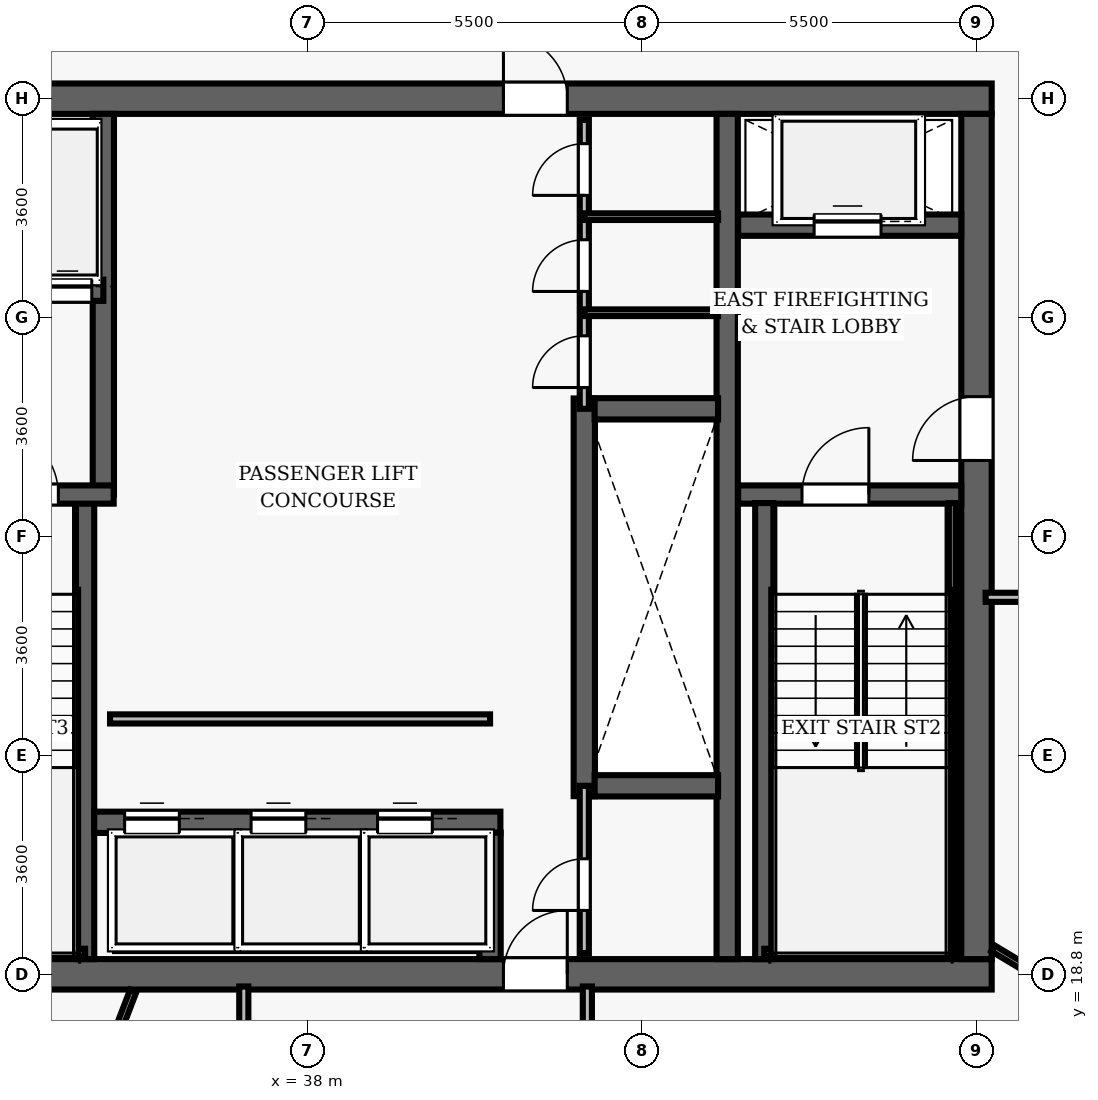
"""IFC4 building model, lengths in metres.
Left out: names, types, materials, properties, quantities, classifications, styles, units other than length and angle.
Written with IfcOpenShell. Run it as: python <this file> out.ifc"""

import sys

from ifc_helpers import new_model, si_unit, direction, frame, frame_2d, origin, place, context, subcontext, project, spatial, rectangle, extrude, element, fill, save


model = new_model("IFC4")
c1 = context("Model", 3, precision=1e-05, world=origin(), true_north=direction((0.0, 1.0)))
c2 = subcontext(c1, "Body", "Model", "MODEL_VIEW")
j1 = project(units=[si_unit("LENGTHUNIT", "METRE"), si_unit("PLANEANGLEUNIT", "RADIAN")], contexts=[c1])
p1 = place(None, origin())
s1 = spatial("IfcSite", under=j1, at=p1, CompositionType="ELEMENT")
p2 = place(p1, origin())
s2 = spatial("IfcBuilding", under=s1, at=p2, CompositionType="ELEMENT")
p3 = place(p2, frame((0.0, 0.0, 186.6)))
s3 = spatial("IfcBuildingStorey", under=s2, at=p3, CompositionType="ELEMENT", Elevation=186.6)
p4 = place(p3, frame((26.75, 18.8, 0.0), z_axis=(0.0, 0.0, 1.0), x_axis=(1.0, 0.0, 0.0)))
e1 = element("IfcWall", 1, at=p4, inside=s3, PredefinedType="SHEAR", context=c2, shape_type="SweptSolid", body=[
    extrude(rectangle(XDim=22.5, YDim=0.5, at=frame_2d((11.25, 0.0))), origin(), (0.0, 0.0, 1.0), 3.85),
])
p5 = place(p4, frame((14.47, 0.0, 0.0)))
e2 = element("IfcOpeningElement", 2, at=p5, cuts=e1, PredefinedType="OPENING", context=c2, shape_type="SweptSolid", body=[
    extrude(rectangle(XDim=1.05, YDim=2.15, at=frame_2d((0.525, 1.075))), frame((0.0, 0.26, 0.0), z_axis=(0.0, -1.0, 0.0), x_axis=(1.0, 0.0, 0.0)), (0.0, 0.0, 1.0), 0.52),
])
p6 = place(p3, frame((26.75, 33.2, 0.0), z_axis=(0.0, 0.0, 1.0), x_axis=(1.0, 0.0, 0.0)))
e3 = element("IfcWall", 3, at=p6, inside=s3, PredefinedType="SHEAR", context=c2, shape_type="SweptSolid", body=[
    extrude(rectangle(XDim=22.5, YDim=0.5, at=frame_2d((11.25, 0.0))), origin(), (0.0, 0.0, 1.0), 3.85),
])
p7 = place(p6, frame((4.57, 0.0, 0.0)))
e4 = element("IfcOpeningElement", 4, at=p7, cuts=e3, PredefinedType="OPENING", context=c2, shape_type="SweptSolid", body=[
    extrude(rectangle(XDim=1.05, YDim=2.15, at=frame_2d((0.525, 1.075))), frame((0.0, 0.26, 0.0), z_axis=(0.0, -1.0, 0.0), x_axis=(1.0, 0.0, 0.0)), (0.0, 0.0, 1.0), 0.52),
])
p8 = place(p6, frame((14.47, 0.0, 0.0)))
e5 = element("IfcOpeningElement", 5, at=p8, cuts=e3, PredefinedType="OPENING", context=c2, shape_type="SweptSolid", body=[
    extrude(rectangle(XDim=1.05, YDim=2.15, at=frame_2d((0.525, 1.075))), frame((0.0, 0.26, 0.0), z_axis=(0.0, -1.0, 0.0), x_axis=(1.0, 0.0, 0.0)), (0.0, 0.0, 1.0), 0.52),
])
p9 = place(p3, frame((49.0, 19.05, 0.0), z_axis=(0.0, 0.0, 1.0), x_axis=(0.0, 1.0, 0.0)))
e6 = element("IfcWall", 6, at=p9, inside=s3, PredefinedType="SHEAR", context=c2, shape_type="SweptSolid", body=[
    extrude(rectangle(XDim=13.9, YDim=0.5, at=frame_2d((6.95, 0.0))), origin(), (0.0, 0.0, 1.0), 3.85),
])
p10 = place(p9, frame((8.2, 0.0, 0.0)))
e7 = element("IfcOpeningElement", 7, at=p10, cuts=e6, PredefinedType="OPENING", context=c2, shape_type="SweptSolid", body=[
    extrude(rectangle(XDim=1.05, YDim=2.15, at=frame_2d((0.525, 1.075))), frame((0.0, 0.26, 0.0), z_axis=(0.0, -1.0, 0.0), x_axis=(1.0, 0.0, 0.0)), (0.0, 0.0, 1.0), 0.52),
])
p11 = place(p3, frame((44.9, 19.05, 0.0), z_axis=(0.0, 0.0, 1.0), x_axis=(0.0, 1.0, 0.0)))
e8 = element("IfcWall", 8, at=p11, inside=s3, PredefinedType="SHEAR", context=c2, shape_type="SweptSolid", body=[
    extrude(rectangle(XDim=13.9, YDim=0.35, at=frame_2d((6.95, 0.0))), origin(), (0.0, 0.0, 1.0), 3.85),
])
p12 = place(p3, frame((45.08, 26.69, 0.0), z_axis=(0.0, 0.0, 1.0), x_axis=(1.0, 0.0, 0.0)))
e9 = element("IfcWall", 9, at=p12, inside=s3, PredefinedType="SHEAR", context=c2, shape_type="SweptSolid", body=[
    extrude(rectangle(XDim=3.67, YDim=0.3, at=frame_2d((1.835, 0.0))), origin(), (0.0, 0.0, 1.0), 3.85),
])
p13 = place(p12, frame((1.05, 0.0, 0.0)))
e10 = element("IfcOpeningElement", 10, at=p13, cuts=e9, PredefinedType="OPENING", context=c2, shape_type="SweptSolid", body=[
    extrude(rectangle(XDim=1.1, YDim=2.15, at=frame_2d((0.55, 1.075))), frame((0.0, 0.16, 0.0), z_axis=(0.0, -1.0, 0.0), x_axis=(1.0, 0.0, 0.0)), (0.0, 0.0, 1.0), 0.32),
])
p14 = place(p3, frame((45.51, 19.05, 0.0), z_axis=(0.0, 0.0, 1.0), x_axis=(0.0, 1.0, 0.0)))
e11 = element("IfcWall", 11, at=p14, inside=s3, PredefinedType="SHEAR", context=c2, shape_type="SweptSolid", body=[
    extrude(rectangle(XDim=7.5, YDim=0.3, at=frame_2d((3.75, 0.0))), origin(), (0.0, 0.0, 1.0), 3.85),
])
p15 = place(p3, frame((48.605, 19.1, 0.0), z_axis=(0.0, 0.0, 1.0), x_axis=(0.0, 1.0, 0.0)))
e12 = element("IfcWall", 12, at=p15, inside=s3, PredefinedType="SHEAR", context=c2, shape_type="SweptSolid", body=[
    extrude(rectangle(XDim=7.45, YDim=0.12, at=frame_2d((3.725, 0.0))), origin(), (0.0, 0.0, 1.0), 3.85),
])
p16 = place(p3, frame((45.51, 19.16, 0.0), z_axis=(0.0, 0.0, 1.0), x_axis=(1.0, 0.0, 0.0)))
e13 = element("IfcWall", 13, at=p16, inside=s3, PredefinedType="SHEAR", context=c2, shape_type="SweptSolid", body=[
    extrude(rectangle(XDim=3.095, YDim=0.12, at=frame_2d((1.547, 0.0))), origin(), (0.0, 0.0, 1.0), 3.85),
])
p17 = place(p3, frame((45.08, 31.12, 0.0), z_axis=(0.0, 0.0, 1.0), x_axis=(1.0, 0.0, 0.0)))
e14 = element("IfcWall", 14, at=p17, inside=s3, PredefinedType="SHEAR", context=c2, shape_type="SweptSolid", body=[
    extrude(rectangle(XDim=3.67, YDim=0.35, at=frame_2d((1.835, 0.0))), origin(), (0.0, 0.0, 1.0), 3.035),
])
p18 = place(p17, frame((1.25, 0.0, 0.0)))
e15 = element("IfcOpeningElement", 15, at=p18, cuts=e14, PredefinedType="OPENING", context=c2, shape_type="SweptSolid", body=[
    extrude(rectangle(XDim=1.1, YDim=2.15, at=frame_2d((0.55, 1.075))), frame((0.0, 0.185, 0.0), z_axis=(0.0, -1.0, 0.0), x_axis=(1.0, 0.0, 0.0)), (0.0, 0.0, 1.0), 0.37),
])
p19 = place(p3, frame((34.34, 19.05, 0.0), z_axis=(0.0, 0.0, 1.0), x_axis=(0.0, 1.0, 0.0)))
e16 = element("IfcWall", 16, at=p19, inside=s3, PredefinedType="SHEAR", context=c2, shape_type="SweptSolid", body=[
    extrude(rectangle(XDim=7.5, YDim=0.3, at=frame_2d((3.75, 0.0))), origin(), (0.0, 0.0, 1.0), 3.85),
])
p20 = place(p3, frame((34.64, 26.69, 0.0), z_axis=(0.0, 0.0, 1.0), x_axis=(0.0, 1.0, 0.0)))
e17 = element("IfcWall", 17, at=p20, inside=s3, PredefinedType="SHEAR", context=c2, shape_type="SweptSolid", body=[
    extrude(rectangle(XDim=6.26, YDim=0.35, at=frame_2d((3.13, 0.0))), origin(), (0.0, 0.0, 1.0), 3.85),
])
p21 = place(p3, frame((31.25, 26.69, 0.0), z_axis=(0.0, 0.0, 1.0), x_axis=(1.0, 0.0, 0.0)))
e18 = element("IfcWall", 18, at=p21, inside=s3, PredefinedType="SHEAR", context=c2, shape_type="SweptSolid", body=[
    extrude(rectangle(XDim=3.56, YDim=0.3, at=frame_2d((1.78, 0.0))), origin(), (0.0, 0.0, 1.0), 3.85),
])
p22 = place(p21, frame((1.55, 0.0, 0.0)))
e19 = element("IfcOpeningElement", 19, at=p22, cuts=e18, PredefinedType="OPENING", context=c2, shape_type="SweptSolid", body=[
    extrude(rectangle(XDim=1.1, YDim=2.15, at=frame_2d((0.55, 1.075))), frame((0.0, 0.16, 0.0), z_axis=(0.0, -1.0, 0.0), x_axis=(1.0, 0.0, 0.0)), (0.0, 0.0, 1.0), 0.32),
])
p23 = place(p3, frame((31.3, 19.16, 0.0), z_axis=(0.0, 0.0, 1.0), x_axis=(1.0, 0.0, 0.0)))
e20 = element("IfcWall", 20, at=p23, inside=s3, PredefinedType="SHEAR", context=c2, shape_type="SweptSolid", body=[
    extrude(rectangle(XDim=3.04, YDim=0.12, at=frame_2d((1.52, 0.0))), origin(), (0.0, 0.0, 1.0), 3.85),
])
p24 = place(p3, frame((32.23, 30.05, 0.0), z_axis=(0.0, 0.0, 1.0), x_axis=(1.0, 0.0, 0.0)))
e21 = element("IfcWall", 21, at=p24, inside=s3, PredefinedType="SHEAR", context=c2, shape_type="SweptSolid", body=[
    extrude(rectangle(XDim=2.41, YDim=0.35, at=frame_2d((1.205, 0.0))), origin(), (0.0, 0.0, 1.0), 3.035),
])
p25 = place(p24, frame((0.42, 0.0, 0.0)))
e22 = element("IfcOpeningElement", 22, at=p25, cuts=e21, PredefinedType="OPENING", context=c2, shape_type="SweptSolid", body=[
    extrude(rectangle(XDim=0.8, YDim=2.15, at=frame_2d((0.4, 1.075))), frame((0.0, 0.185, 0.0), z_axis=(0.0, -1.0, 0.0), x_axis=(1.0, 0.0, 0.0)), (0.0, 0.0, 1.0), 0.37),
])
p26 = place(p24, frame((1.42, 0.0, 0.0)))
e23 = element("IfcOpeningElement", 23, at=p26, cuts=e21, PredefinedType="OPENING", context=c2, shape_type="SweptSolid", body=[
    extrude(rectangle(XDim=0.8, YDim=2.15, at=frame_2d((0.4, 1.075))), frame((0.0, 0.185, 0.0), z_axis=(0.0, -1.0, 0.0), x_axis=(1.0, 0.0, 0.0)), (0.0, 0.0, 1.0), 0.37),
])
p27 = place(p3, frame((42.55, 21.73, 0.0), z_axis=(0.0, 0.0, 1.0), x_axis=(0.0, 1.0, 0.0)))
e24 = element("IfcWall", 24, at=p27, inside=s3, PredefinedType="SHEAR", context=c2, shape_type="SweptSolid", body=[
    extrude(rectangle(XDim=6.54, YDim=0.35, at=frame_2d((3.27, 0.0))), origin(), (0.0, 0.0, 1.0), 3.035),
])
for number, where, z_axis, x_axis in (
    (25, (42.72, 21.9, 0.0), (0.0, 0.0, 1.0), (1.0, 0.0, 0.0)),
    (26, (42.72, 28.1, 0.0), (0.0, 0.0, 1.0), (1.0, 0.0, 0.0)),
):
    element("IfcWall", number, at=place(p3, frame(where, z_axis=z_axis, x_axis=x_axis)), inside=s3, PredefinedType="SHEAR", context=c2, shape_type="SweptSolid", body=[
        extrude(rectangle(XDim=2.03, YDim=0.35, at=frame_2d((1.015, 0.0))), origin(), (0.0, 0.0, 1.0), 3.035),
    ])
p28 = place(p3, frame((34.49, 21.3, 0.0), z_axis=(0.0, 0.0, 1.0), x_axis=(1.0, 0.0, 0.0)))
e27 = element("IfcWall", 27, at=p28, inside=s3, PredefinedType="SHEAR", context=c2, shape_type="SweptSolid", body=[
    extrude(rectangle(XDim=6.68, YDim=0.35, at=frame_2d((3.34, 0.0))), origin(), (0.0, 0.0, 1.0), 3.035),
])
p29 = place(p28, frame((0.5, 0.0, 0.0)))
e28 = element("IfcOpeningElement", 28, at=p29, cuts=e27, PredefinedType="OPENING", context=c2, shape_type="SweptSolid", body=[
    extrude(rectangle(XDim=0.9, YDim=2.15, at=frame_2d((0.45, 1.075))), frame((0.0, 0.185, 0.0), z_axis=(0.0, -1.0, 0.0), x_axis=(1.0, 0.0, 0.0)), (0.0, 0.0, 1.0), 0.37),
])
p30 = place(p28, frame((2.58, 0.0, 0.0)))
e29 = element("IfcOpeningElement", 29, at=p30, cuts=e27, PredefinedType="OPENING", context=c2, shape_type="SweptSolid", body=[
    extrude(rectangle(XDim=0.9, YDim=2.15, at=frame_2d((0.45, 1.075))), frame((0.0, 0.185, 0.0), z_axis=(0.0, -1.0, 0.0), x_axis=(1.0, 0.0, 0.0)), (0.0, 0.0, 1.0), 0.37),
])
p31 = place(p28, frame((4.66, 0.0, 0.0)))
e30 = element("IfcOpeningElement", 30, at=p31, cuts=e27, PredefinedType="OPENING", context=c2, shape_type="SweptSolid", body=[
    extrude(rectangle(XDim=0.9, YDim=2.15, at=frame_2d((0.45, 1.075))), frame((0.0, 0.185, 0.0), z_axis=(0.0, -1.0, 0.0), x_axis=(1.0, 0.0, 0.0)), (0.0, 0.0, 1.0), 0.37),
])
p32 = place(p3, frame((41.0, 19.05, 0.0), z_axis=(0.0, 0.0, 1.0), x_axis=(0.0, 1.0, 0.0)))
e31 = element("IfcWall", 31, at=p32, inside=s3, PredefinedType="SHEAR", context=c2, shape_type="SweptSolid", body=[
    extrude(rectangle(XDim=2.08, YDim=0.35, at=frame_2d((1.04, 0.0))), origin(), (0.0, 0.0, 1.0), 3.035),
])
p33 = place(p3, frame((34.75, 23.0, 0.0), z_axis=(0.0, 0.0, 1.0), x_axis=(1.0, 0.0, 0.0)))
e32 = element("IfcWall", 32, at=p33, inside=s3, PredefinedType="PARTITIONING", context=c2, shape_type="SweptSolid", body=[
    extrude(rectangle(XDim=6.25, YDim=0.15, at=frame_2d((3.125, 0.0))), origin(), (0.0, 0.0, 1.0), 3.035),
])
p34 = place(p3, frame((42.55, 28.1, 0.0), z_axis=(0.0, 0.0, 1.0), x_axis=(0.0, 1.0, 0.0)))
e33 = element("IfcWall", 33, at=p34, inside=s3, PredefinedType="PARTITIONING", context=c2, shape_type="SweptSolid", body=[
    extrude(rectangle(XDim=4.75, YDim=0.15, at=frame_2d((2.375, 0.0))), origin(), (0.0, 0.0, 1.0), 3.035),
])
p35 = place(p34, frame((0.35, 0.0, 0.0)))
e34 = element("IfcOpeningElement", 34, at=p35, cuts=e33, PredefinedType="OPENING", context=c2, shape_type="SweptSolid", body=[
    extrude(rectangle(XDim=0.85, YDim=2.1, at=frame_2d((0.425, 1.05))), frame((0.0, 0.085, 0.0), z_axis=(0.0, -1.0, 0.0), x_axis=(1.0, 0.0, 0.0)), (0.0, 0.0, 1.0), 0.17),
])
p36 = place(p34, frame((1.93, 0.0, 0.0)))
e35 = element("IfcOpeningElement", 35, at=p36, cuts=e33, PredefinedType="OPENING", context=c2, shape_type="SweptSolid", body=[
    extrude(rectangle(XDim=0.85, YDim=2.1, at=frame_2d((0.425, 1.05))), frame((0.0, 0.085, 0.0), z_axis=(0.0, -1.0, 0.0), x_axis=(1.0, 0.0, 0.0)), (0.0, 0.0, 1.0), 0.17),
])
p37 = place(p34, frame((3.51, 0.0, 0.0)))
e36 = element("IfcOpeningElement", 36, at=p37, cuts=e33, PredefinedType="OPENING", context=c2, shape_type="SweptSolid", body=[
    extrude(rectangle(XDim=0.85, YDim=2.1, at=frame_2d((0.425, 1.05))), frame((0.0, 0.085, 0.0), z_axis=(0.0, -1.0, 0.0), x_axis=(1.0, 0.0, 0.0)), (0.0, 0.0, 1.0), 0.17),
])
for number, where, z_axis, x_axis in (
    (37, (42.55, 29.68, 0.0), (0.0, 0.0, 1.0), (1.0, 0.0, 0.0)),
    (38, (42.55, 31.26, 0.0), (0.0, 0.0, 1.0), (1.0, 0.0, 0.0)),
):
    element("IfcWall", number, at=place(p3, frame(where, z_axis=z_axis, x_axis=x_axis)), inside=s3, PredefinedType="PARTITIONING", context=c2, shape_type="SweptSolid", body=[
        extrude(rectangle(XDim=2.2, YDim=0.11, at=frame_2d((1.1, 0.0))), origin(), (0.0, 0.0, 1.0), 3.035),
    ])
p38 = place(p3, frame((42.55, 19.15, 0.0), z_axis=(0.0, 0.0, 1.0), x_axis=(0.0, 1.0, 0.0)))
e39 = element("IfcWall", 39, at=p38, inside=s3, PredefinedType="PARTITIONING", context=c2, shape_type="SweptSolid", body=[
    extrude(rectangle(XDim=2.75, YDim=0.15, at=frame_2d((1.375, 0.0))), origin(), (0.0, 0.0, 1.0), 3.035),
])
p39 = place(p38, frame((0.7, 0.0, 0.0)))
e40 = element("IfcOpeningElement", 40, at=p39, cuts=e39, PredefinedType="OPENING", context=c2, shape_type="SweptSolid", body=[
    extrude(rectangle(XDim=0.85, YDim=2.1, at=frame_2d((0.425, 1.05))), frame((0.0, 0.085, 0.0), z_axis=(0.0, -1.0, 0.0), x_axis=(1.0, 0.0, 0.0)), (0.0, 0.0, 1.0), 0.17),
])
p40 = place(p3, frame((49.15, 25.0, 0.0), z_axis=(0.0, 0.0, 1.0), x_axis=(1.0, 0.0, 0.0)))
e41 = element("IfcWall", 41, at=p40, inside=s3, PredefinedType="PARTITIONING", context=c2, shape_type="SweptSolid", body=[
    extrude(rectangle(XDim=10.958, YDim=0.15, at=frame_2d((5.479, 0.0))), origin(), (0.0, 0.0, 1.0), 3.035),
])
p41 = place(p40, frame((2.264, 0.0, 0.0)))
e42 = element("IfcOpeningElement", 42, at=p41, cuts=e41, PredefinedType="OPENING", context=c2, shape_type="SweptSolid", body=[
    extrude(rectangle(XDim=0.95, YDim=2.15, at=frame_2d((0.475, 1.075))), frame((0.0, 0.085, 0.0), z_axis=(0.0, -1.0, 0.0), x_axis=(1.0, 0.0, 0.0)), (0.0, 0.0, 1.0), 0.17),
])
p42 = place(p3, frame((36.95, 11.2, 0.0), z_axis=(0.0, 0.0, 1.0), x_axis=(0.0, 1.0, 0.0)))
e43 = element("IfcWall", 43, at=p42, inside=s3, PredefinedType="PARTITIONING", context=c2, shape_type="SweptSolid", body=[
    extrude(rectangle(XDim=7.4, YDim=0.15, at=frame_2d((3.7, 0.0))), origin(), (0.0, 0.0, 1.0), 3.035),
])
p43 = place(p42, frame((5.075, 0.0, 0.0)))
e44 = element("IfcOpeningElement", 44, at=p43, cuts=e43, PredefinedType="OPENING", context=c2, shape_type="SweptSolid", body=[
    extrude(rectangle(XDim=0.95, YDim=2.15, at=frame_2d((0.475, 1.075))), frame((0.0, 0.085, 0.0), z_axis=(0.0, -1.0, 0.0), x_axis=(1.0, 0.0, 0.0)), (0.0, 0.0, 1.0), 0.17),
])
p44 = place(p3, frame((42.6, 16.65, 0.0), z_axis=(0.0, 0.0, 1.0), x_axis=(0.0, 1.0, 0.0)))
e45 = element("IfcWall", 45, at=p44, inside=s3, PredefinedType="PARTITIONING", context=c2, shape_type="SweptSolid", body=[
    extrude(rectangle(XDim=1.95, YDim=0.15, at=frame_2d((0.975, 0.0))), origin(), (0.0, 0.0, 1.0), 3.035),
])
p45 = place(p3, frame((35.133, 18.53, 0.0), z_axis=(0.0, 0.0, 1.0), x_axis=(-0.358378051457, -0.933576548674, 0.0)))
e46 = element("IfcWall", 46, at=p45, inside=s3, PredefinedType="PARTITIONING", context=c2, shape_type="SweptSolid", body=[
    extrude(rectangle(XDim=14.156, YDim=0.11, at=frame_2d((7.078, 0.0))), origin(), (0.0, 0.0, 1.0), 3.035),
])
p46 = place(p3, frame((49.27, 19.228, 0.0), z_axis=(0.0, 0.0, 1.0), x_axis=(0.857170387161, -0.515032938145, 0.0)))
e47 = element("IfcWall", 47, at=p46, inside=s3, PredefinedType="PARTITIONING", context=c2, shape_type="SweptSolid", body=[
    extrude(rectangle(XDim=14.902, YDim=0.11, at=frame_2d((7.451, 0.0))), origin(), (0.0, 0.0, 1.0), 3.035),
])
p47 = place(p13, origin())
e48 = element("IfcDoor", 48, at=p47, inside=s3, OperationType="SINGLE_SWING_RIGHT", PredefinedType="DOOR", context=c2, shape_type="SweptSolid", body=[
    extrude(rectangle(XDim=1.1, YDim=2.15, at=frame_2d((0.55, 1.075))), frame((0.0, 0.025, 0.0), z_axis=(0.0, -1.0, 0.0), x_axis=(1.0, 0.0, 0.0)), (0.0, 0.0, 1.0), 0.05),
])
fill(e10, e48)
p48 = place(p10, origin())
e49 = element("IfcDoor", 49, at=p48, inside=s3, OperationType="SINGLE_SWING_LEFT", PredefinedType="DOOR", context=c2, shape_type="SweptSolid", body=[
    extrude(rectangle(XDim=1.05, YDim=2.15, at=frame_2d((0.525, 1.075))), frame((0.0, 0.025, 0.0), z_axis=(0.0, -1.0, 0.0), x_axis=(1.0, 0.0, 0.0)), (0.0, 0.0, 1.0), 0.05),
])
fill(e7, e49)
p49 = place(p22, origin())
e50 = element("IfcDoor", 50, at=p49, inside=s3, OperationType="SINGLE_SWING_LEFT", PredefinedType="DOOR", context=c2, shape_type="SweptSolid", body=[
    extrude(rectangle(XDim=1.1, YDim=2.15, at=frame_2d((0.55, 1.075))), frame((0.0, 0.025, 0.0), z_axis=(0.0, -1.0, 0.0), x_axis=(1.0, 0.0, 0.0)), (0.0, 0.0, 1.0), 0.05),
])
fill(e19, e50)
p50 = place(p8, origin())
e51 = element("IfcDoor", 51, at=p50, inside=s3, OperationType="SINGLE_SWING_LEFT", PredefinedType="DOOR", context=c2, shape_type="SweptSolid", body=[
    extrude(rectangle(XDim=1.05, YDim=2.15, at=frame_2d((0.525, 1.075))), frame((0.0, 0.025, 0.0), z_axis=(0.0, -1.0, 0.0), x_axis=(1.0, 0.0, 0.0)), (0.0, 0.0, 1.0), 0.05),
])
fill(e5, e51)
p51 = place(p5, origin())
e52 = element("IfcDoor", 52, at=p51, inside=s3, OperationType="SINGLE_SWING_RIGHT", PredefinedType="DOOR", context=c2, shape_type="SweptSolid", body=[
    extrude(rectangle(XDim=1.05, YDim=2.15, at=frame_2d((0.525, 1.075))), frame((0.0, 0.025, 0.0), z_axis=(0.0, -1.0, 0.0), x_axis=(1.0, 0.0, 0.0)), (0.0, 0.0, 1.0), 0.05),
])
fill(e2, e52)
p52 = place(p35, origin())
e53 = element("IfcDoor", 53, at=p52, inside=s3, OperationType="SINGLE_SWING_LEFT", PredefinedType="DOOR", context=c2, shape_type="SweptSolid", body=[
    extrude(rectangle(XDim=0.85, YDim=2.1, at=frame_2d((0.425, 1.05))), frame((0.0, 0.025, 0.0), z_axis=(0.0, -1.0, 0.0), x_axis=(1.0, 0.0, 0.0)), (0.0, 0.0, 1.0), 0.05),
])
fill(e34, e53)
p53 = place(p36, origin())
e54 = element("IfcDoor", 54, at=p53, inside=s3, OperationType="SINGLE_SWING_LEFT", PredefinedType="DOOR", context=c2, shape_type="SweptSolid", body=[
    extrude(rectangle(XDim=0.85, YDim=2.1, at=frame_2d((0.425, 1.05))), frame((0.0, 0.025, 0.0), z_axis=(0.0, -1.0, 0.0), x_axis=(1.0, 0.0, 0.0)), (0.0, 0.0, 1.0), 0.05),
])
fill(e35, e54)
p54 = place(p37, origin())
e55 = element("IfcDoor", 55, at=p54, inside=s3, OperationType="SINGLE_SWING_LEFT", PredefinedType="DOOR", context=c2, shape_type="SweptSolid", body=[
    extrude(rectangle(XDim=0.85, YDim=2.1, at=frame_2d((0.425, 1.05))), frame((0.0, 0.025, 0.0), z_axis=(0.0, -1.0, 0.0), x_axis=(1.0, 0.0, 0.0)), (0.0, 0.0, 1.0), 0.05),
])
fill(e36, e55)
p55 = place(p39, origin())
e56 = element("IfcDoor", 56, at=p55, inside=s3, OperationType="SINGLE_SWING_LEFT", PredefinedType="DOOR", context=c2, shape_type="SweptSolid", body=[
    extrude(rectangle(XDim=0.85, YDim=2.1, at=frame_2d((0.425, 1.05))), frame((0.0, 0.025, 0.0), z_axis=(0.0, -1.0, 0.0), x_axis=(1.0, 0.0, 0.0)), (0.0, 0.0, 1.0), 0.05),
])
fill(e40, e56)
p56 = place(p29, origin())
e57 = element("IfcDoor", 57, at=p56, inside=s3, OperationType="SLIDING_TO_LEFT", PredefinedType="DOOR", context=c2, shape_type="SweptSolid", body=[
    extrude(rectangle(XDim=0.9, YDim=2.15, at=frame_2d((0.45, 1.075))), frame((0.0, 0.025, 0.0), z_axis=(0.0, -1.0, 0.0), x_axis=(1.0, 0.0, 0.0)), (0.0, 0.0, 1.0), 0.05),
])
fill(e28, e57)
p57 = place(p30, origin())
e58 = element("IfcDoor", 58, at=p57, inside=s3, OperationType="SLIDING_TO_LEFT", PredefinedType="DOOR", context=c2, shape_type="SweptSolid", body=[
    extrude(rectangle(XDim=0.9, YDim=2.15, at=frame_2d((0.45, 1.075))), frame((0.0, 0.025, 0.0), z_axis=(0.0, -1.0, 0.0), x_axis=(1.0, 0.0, 0.0)), (0.0, 0.0, 1.0), 0.05),
])
fill(e29, e58)
p58 = place(p31, origin())
e59 = element("IfcDoor", 59, at=p58, inside=s3, OperationType="SLIDING_TO_LEFT", PredefinedType="DOOR", context=c2, shape_type="SweptSolid", body=[
    extrude(rectangle(XDim=0.9, YDim=2.15, at=frame_2d((0.45, 1.075))), frame((0.0, 0.025, 0.0), z_axis=(0.0, -1.0, 0.0), x_axis=(1.0, 0.0, 0.0)), (0.0, 0.0, 1.0), 0.05),
])
fill(e30, e59)
p59 = place(p18, origin())
e60 = element("IfcDoor", 60, at=p59, inside=s3, OperationType="SLIDING_TO_LEFT", PredefinedType="DOOR", context=c2, shape_type="SweptSolid", body=[
    extrude(rectangle(XDim=1.1, YDim=2.15, at=frame_2d((0.55, 1.075))), frame((0.0, 0.025, 0.0), z_axis=(0.0, -1.0, 0.0), x_axis=(1.0, 0.0, 0.0)), (0.0, 0.0, 1.0), 0.05),
])
fill(e15, e60)
p60 = place(p26, origin())
e61 = element("IfcDoor", 61, at=p60, inside=s3, OperationType="SLIDING_TO_LEFT", PredefinedType="DOOR", context=c2, shape_type="SweptSolid", body=[
    extrude(rectangle(XDim=0.8, YDim=2.15, at=frame_2d((0.4, 1.075))), frame((0.0, 0.025, 0.0), z_axis=(0.0, -1.0, 0.0), x_axis=(1.0, 0.0, 0.0)), (0.0, 0.0, 1.0), 0.05),
])
fill(e23, e61)
save(model, sys.argv[1])
